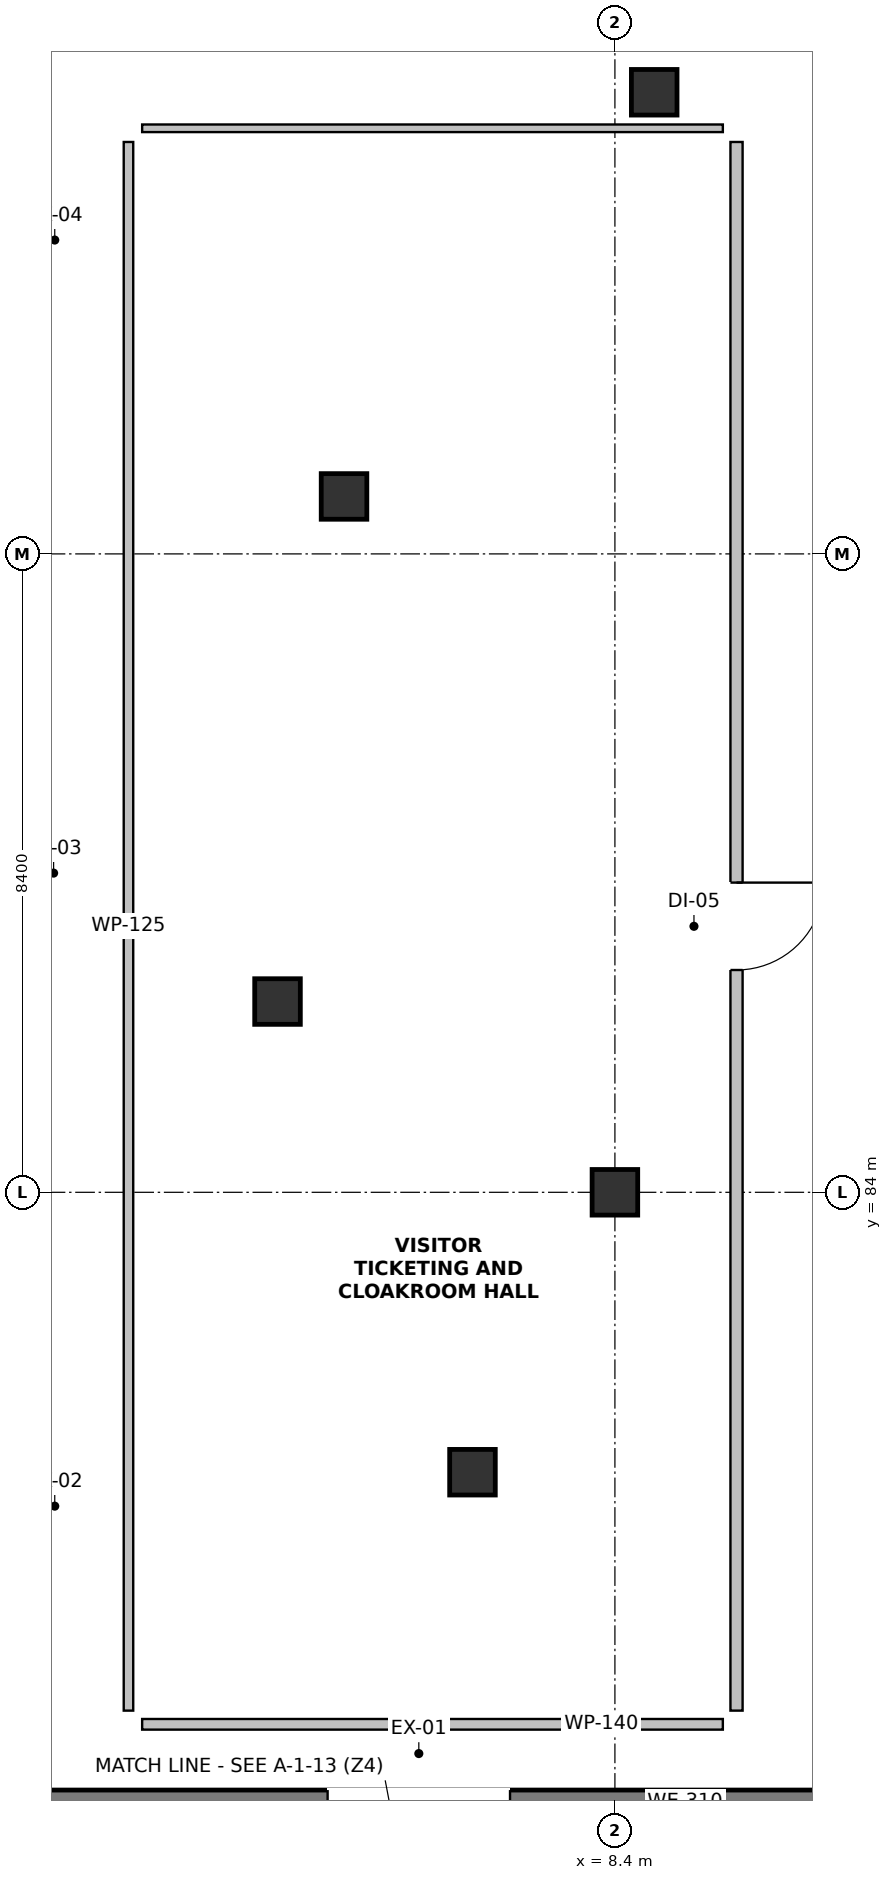
"""IFC4 building model, lengths in metres.
Left out: names, types, materials, properties, quantities, classifications, styles, units other than length and angle.
Written with IfcOpenShell. Run it as: python <this file> out.ifc"""

import sys

from ifc_helpers import new_model, si_unit, direction, frame, frame_2d, origin, origin_2d, place, context, subcontext, project, spatial, rectangle, extrude, element, fill, save


model = new_model("IFC4")
c1 = context("Model", 3, precision=1e-05, world=origin(), true_north=direction((0.0, 1.0)))
c2 = subcontext(c1, "Body", "Model", "MODEL_VIEW")
j1 = project(units=[si_unit("LENGTHUNIT", "METRE"), si_unit("PLANEANGLEUNIT", "RADIAN")], contexts=[c1])
p1 = place(None, origin())
s1 = spatial("IfcSite", under=j1, at=p1, CompositionType="ELEMENT")
p2 = place(p1, origin())
s2 = spatial("IfcBuilding", under=s1, at=p2, CompositionType="ELEMENT")
p3 = place(p2, origin())
s3 = spatial("IfcBuildingStorey", under=s2, at=p3, CompositionType="ELEMENT", Elevation=0.0)
for number, where, z_axis, x_axis in (
    (1, (8.917, 98.474, 0.0), (0.0, 0.0, 1.0), (1.0, 0.0, 0.0)),
    (2, (4.836, 93.156, 0.0), (0.0, 0.0, 1.0), (1.0, 0.0, 0.0)),
    (3, (3.961, 86.51, 0.0), (0.0, 0.0, 1.0), (1.0, 0.0, 0.0)),
    (4, (6.526, 80.317, 0.0), (0.0, 0.0, 1.0), (1.0, 0.0, 0.0)),
    (5, (8.4, 84.0, 0.0), (0.0, 0.0, 1.0), (1.0, 0.0, 0.0)),
):
    element("IfcColumn", number, at=place(p3, frame(where, z_axis=z_axis, x_axis=x_axis)), inside=s3, PredefinedType="COLUMN", context=c2, shape_type="SweptSolid", body=[
        extrude(rectangle(XDim=0.6, YDim=0.6, at=origin_2d()), origin(), (0.0, 0.0, 1.0), 5.1),
    ])
p4 = place(p3, frame((11.529, 75.98, 0.0), z_axis=(0.0, 0.0, 1.0), x_axis=(-1.0, 0.0, 0.0)))
e6 = element("IfcWall", 6, at=p4, inside=s3, PredefinedType="SOLIDWALL", context=c2, shape_type="SweptSolid", body=[
    extrude(rectangle(XDim=11.149, YDim=0.31, at=frame_2d((5.575, 0.0))), origin(), (0.0, 0.0, 1.0), 4.08),
])
p5 = place(p4, frame((4.509, 0.0, 0.0)))
e7 = element("IfcOpeningElement", 7, at=p5, cuts=e6, PredefinedType="OPENING", context=c2, shape_type="SweptSolid", body=[
    extrude(rectangle(XDim=2.4, YDim=2.45, at=frame_2d((1.2, 1.225))), frame((0.0, 0.167, 0.0), z_axis=(0.0, -1.0, 0.0), x_axis=(1.0, 0.0, 0.0)), (0.0, 0.0, 1.0), 0.334),
])
p6 = place(p3, frame((2.18, 98.0, 0.0), z_axis=(0.0, 0.0, 1.0), x_axis=(1.0, 0.0, 0.0)))
e8 = element("IfcWall", 8, at=p6, inside=s3, PredefinedType="PARTITIONING", context=c2, shape_type="SweptSolid", body=[
    extrude(rectangle(XDim=7.64, YDim=0.1, at=frame_2d((3.82, 0.0))), origin(), (0.0, 0.0, 1.0), 3.95),
])
p7 = place(p3, frame((10.0, 97.82, 0.0), z_axis=(0.0, 0.0, 1.0), x_axis=(0.0, -1.0, 0.0)))
e9 = element("IfcWall", 9, at=p7, inside=s3, PredefinedType="PARTITIONING", context=c2, shape_type="SweptSolid", body=[
    extrude(rectangle(XDim=20.64, YDim=0.16, at=frame_2d((10.32, 0.0))), origin(), (0.0, 0.0, 1.0), 4.7),
])
p8 = place(p7, frame((9.745, 0.0, 0.0)))
e10 = element("IfcOpeningElement", 10, at=p8, cuts=e9, PredefinedType="OPENING", context=c2, shape_type="SweptSolid", body=[
    extrude(rectangle(XDim=1.15, YDim=2.15, at=frame_2d((0.575, 1.075))), frame((0.0, 0.092, 0.0), z_axis=(0.0, -1.0, 0.0), x_axis=(1.0, 0.0, 0.0)), (0.0, 0.0, 1.0), 0.184),
])
p9 = place(p3, frame((9.82, 77.0, 0.0), z_axis=(0.0, 0.0, 1.0), x_axis=(-1.0, 0.0, 0.0)))
e11 = element("IfcWall", 11, at=p9, inside=s3, PredefinedType="PARTITIONING", context=c2, shape_type="SweptSolid", body=[
    extrude(rectangle(XDim=7.64, YDim=0.14, at=frame_2d((3.82, 0.0))), origin(), (0.0, 0.0, 1.0), 4.7),
])
p10 = place(p3, frame((2.0, 77.18, 0.0), z_axis=(0.0, 0.0, 1.0), x_axis=(0.0, 1.0, 0.0)))
e12 = element("IfcWall", 12, at=p10, inside=s3, PredefinedType="PARTITIONING", context=c2, shape_type="SweptSolid", body=[
    extrude(rectangle(XDim=20.64, YDim=0.125, at=frame_2d((10.32, 0.0))), origin(), (0.0, 0.0, 1.0), 4.7),
])
p11 = place(p5, origin())
e13 = element("IfcDoor", 13, at=p11, inside=s3, OperationType="DOUBLE_DOOR_SINGLE_SWING", PredefinedType="DOOR", context=c2, shape_type="SweptSolid", body=[
    extrude(rectangle(XDim=2.4, YDim=2.45, at=frame_2d((1.2, 1.225))), frame((0.0, 0.025, 0.0), z_axis=(0.0, -1.0, 0.0), x_axis=(1.0, 0.0, 0.0)), (0.0, 0.0, 1.0), 0.05),
])
fill(e7, e13)
p12 = place(p8, origin())
e14 = element("IfcDoor", 14, at=p12, inside=s3, OperationType="SINGLE_SWING_LEFT", PredefinedType="DOOR", context=c2, shape_type="SweptSolid", body=[
    extrude(rectangle(XDim=1.15, YDim=2.15, at=frame_2d((0.575, 1.075))), frame((0.0, 0.025, 0.0), z_axis=(0.0, -1.0, 0.0), x_axis=(1.0, 0.0, 0.0)), (0.0, 0.0, 1.0), 0.05),
])
fill(e10, e14)
save(model, sys.argv[1])
